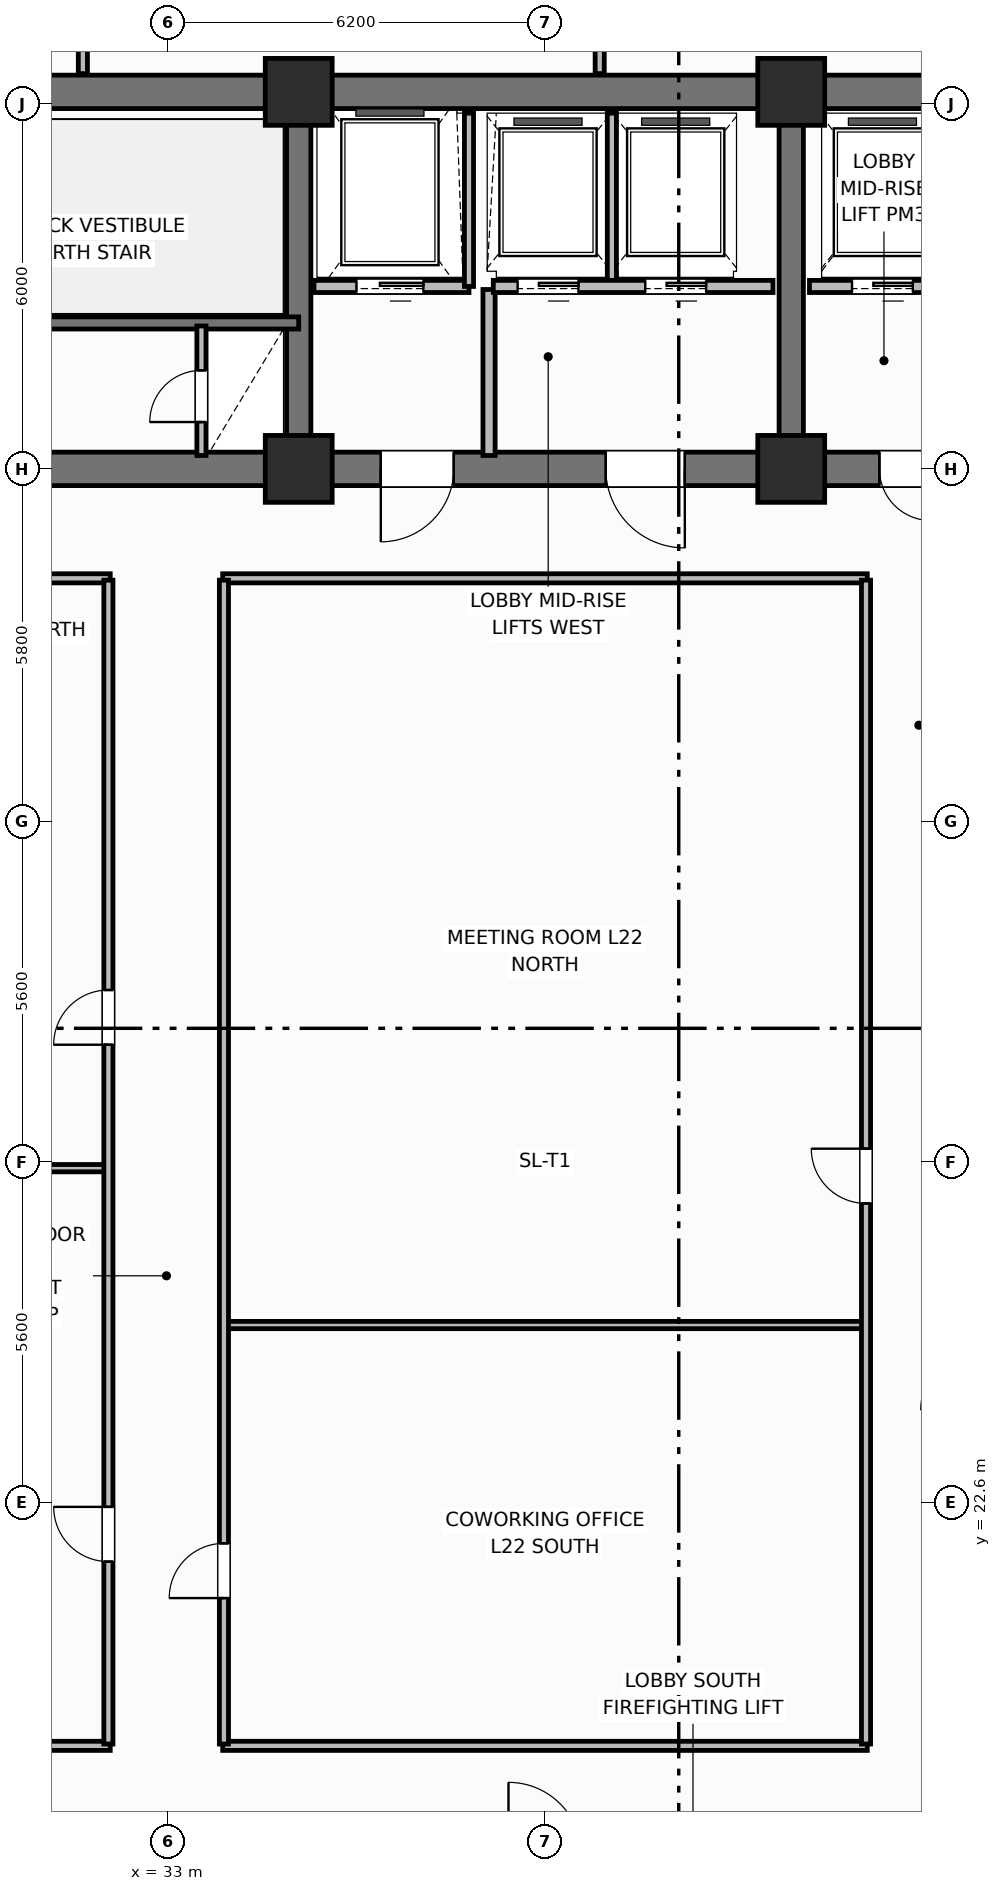
"""IFC4 building model, lengths in metres.
Left out: names, types, materials, properties, quantities, classifications, styles, units other than length and angle.
Written with IfcOpenShell. Run it as: python <this file> out.ifc"""

import sys

from ifc_helpers import new_model, si_unit, direction, frame, frame_2d, origin, origin_2d, place, context, subcontext, project, spatial, rectangle, extrude, element, fill, save


model = new_model("IFC4")
c1 = context("Model", 3, precision=1e-05, world=origin(), true_north=direction((0.0, 1.0)))
c2 = subcontext(c1, "Body", "Model", "MODEL_VIEW")
j1 = project(units=[si_unit("LENGTHUNIT", "METRE"), si_unit("PLANEANGLEUNIT", "RADIAN")], contexts=[c1])
p1 = place(None, origin())
s1 = spatial("IfcSite", under=j1, at=p1, CompositionType="ELEMENT")
p2 = place(p1, origin())
s2 = spatial("IfcBuilding", under=s1, at=p2, CompositionType="ELEMENT")
p3 = place(p2, frame((0.0, 0.0, 92.0)))
s3 = spatial("IfcBuildingStorey", under=s2, at=p3, CompositionType="ELEMENT", Elevation=92.0)
p4 = place(p3, frame((25.6, 45.8, 0.0), z_axis=(0.0, 0.0, 1.0), x_axis=(1.0, 0.0, 0.0)))
e1 = element("IfcWall", 1, at=p4, inside=s3, PredefinedType="SHEAR", context=c2, shape_type="SweptSolid", body=[
    extrude(rectangle(XDim=27.2, YDim=0.55, at=frame_2d((13.6, 0.0))), origin(), (0.0, 0.0, 1.0), 3.7),
])
p5 = place(p3, frame((52.8, 39.6, 0.0), z_axis=(0.0, 0.0, 1.0), x_axis=(-1.0, 0.0, 0.0)))
e2 = element("IfcWall", 2, at=p5, inside=s3, PredefinedType="SHEAR", context=c2, shape_type="SweptSolid", body=[
    extrude(rectangle(XDim=27.2, YDim=0.55, at=frame_2d((13.6, 0.0))), origin(), (0.0, 0.0, 1.0), 3.7),
])
p6 = place(p5, frame((24.2, 0.0, 0.0)))
e3 = element("IfcOpeningElement", 3, at=p6, cuts=e2, PredefinedType="OPENING", context=c2, shape_type="SweptSolid", body=[
    extrude(rectangle(XDim=1.1, YDim=2.15, at=frame_2d((0.55, 1.075))), frame((0.0, 0.285, 0.0), z_axis=(0.0, -1.0, 0.0), x_axis=(1.0, 0.0, 0.0)), (0.0, 0.0, 1.0), 0.57),
])
p7 = place(p5, frame((15.1, 0.0, 0.0)))
e4 = element("IfcOpeningElement", 4, at=p7, cuts=e2, PredefinedType="OPENING", context=c2, shape_type="SweptSolid", body=[
    extrude(rectangle(XDim=1.2, YDim=2.15, at=frame_2d((0.6, 1.075))), frame((0.0, 0.285, 0.0), z_axis=(0.0, -1.0, 0.0), x_axis=(1.0, 0.0, 0.0)), (0.0, 0.0, 1.0), 0.57),
])
p8 = place(p5, frame((11.3, 0.0, 0.0)))
e5 = element("IfcOpeningElement", 5, at=p8, cuts=e2, PredefinedType="OPENING", context=c2, shape_type="SweptSolid", body=[
    extrude(rectangle(XDim=1.3, YDim=2.2, at=frame_2d((0.65, 1.1))), frame((0.0, 0.285, 0.0), z_axis=(0.0, -1.0, 0.0), x_axis=(1.0, 0.0, 0.0)), (0.0, 0.0, 1.0), 0.57),
])
p9 = place(p5, frame((7.25, 0.0, 0.0)))
e6 = element("IfcOpeningElement", 6, at=p9, cuts=e2, PredefinedType="OPENING", context=c2, shape_type="SweptSolid", body=[
    extrude(rectangle(XDim=0.85, YDim=2.1, at=frame_2d((0.425, 1.05))), frame((0.0, 0.285, 0.0), z_axis=(0.0, -1.0, 0.0), x_axis=(1.0, 0.0, 0.0)), (0.0, 0.0, 1.0), 0.57),
])
p10 = place(p5, frame((3.0, 0.0, 0.0)))
e7 = element("IfcOpeningElement", 7, at=p10, cuts=e2, PredefinedType="OPENING", context=c2, shape_type="SweptSolid", body=[
    extrude(rectangle(XDim=0.9, YDim=2.1, at=frame_2d((0.45, 1.05))), frame((0.0, 0.285, 0.0), z_axis=(0.0, -1.0, 0.0), x_axis=(1.0, 0.0, 0.0)), (0.0, 0.0, 1.0), 0.57),
])
for number, where, z_axis, x_axis in (
    (8, (35.15, 39.875, 0.0), (0.0, 0.0, 1.0), (0.0, 1.0, 0.0)),
    (9, (43.25, 39.875, 0.0), (0.0, 0.0, 1.0), (0.0, 1.0, 0.0)),
):
    element("IfcWall", number, at=place(p3, frame(where, z_axis=z_axis, x_axis=x_axis)), inside=s3, PredefinedType="SHEAR", context=c2, shape_type="SweptSolid", body=[
        extrude(rectangle(XDim=5.65, YDim=0.4, at=frame_2d((2.825, 0.0))), origin(), (0.0, 0.0, 1.0), 3.7),
    ])
for number, where, z_axis, x_axis in (
    (10, (35.15, 39.6, 0.0), (0.0, 0.0, 1.0), (1.0, 0.0, 0.0)),
    (11, (35.15, 45.8, 0.0), (0.0, 0.0, 1.0), (1.0, 0.0, 0.0)),
    (12, (43.25, 39.6, 0.0), (0.0, 0.0, 1.0), (1.0, 0.0, 0.0)),
    (13, (43.25, 45.8, 0.0), (0.0, 0.0, 1.0), (1.0, 0.0, 0.0)),
):
    element("IfcColumn", number, at=place(p3, frame(where, z_axis=z_axis, x_axis=x_axis)), inside=s3, PredefinedType="COLUMN", context=c2, shape_type="SweptSolid", body=[
        extrude(rectangle(XDim=1.1, YDim=1.1, at=origin_2d()), origin(), (0.0, 0.0, 1.0), 3.7),
    ])
p11 = place(p3, frame((35.15, 42.0, 0.0), z_axis=(0.0, 0.0, 1.0), x_axis=(-1.0, 0.0, 0.0)))
e14 = element("IfcWall", 14, at=p11, inside=s3, PredefinedType="SHEAR", context=c2, shape_type="SweptSolid", body=[
    extrude(rectangle(XDim=9.55, YDim=0.2, at=frame_2d((4.775, 0.0))), origin(), (0.0, 0.0, 1.0), 3.7),
])
p12 = place(p11, frame((7.25, 0.0, 0.0)))
e15 = element("IfcOpeningElement", 15, at=p12, cuts=e14, PredefinedType="OPENING", context=c2, shape_type="SweptSolid", body=[
    extrude(rectangle(XDim=1.1, YDim=2.15, at=frame_2d((0.55, 1.075))), frame((0.0, 0.11, 0.0), z_axis=(0.0, -1.0, 0.0), x_axis=(1.0, 0.0, 0.0)), (0.0, 0.0, 1.0), 0.22),
])
p13 = place(p3, frame((33.55, 39.82, 0.0), z_axis=(0.0, 0.0, 1.0), x_axis=(0.0, 1.0, 0.0)))
e16 = element("IfcWall", 16, at=p13, inside=s3, PredefinedType="PARTITIONING", context=c2, shape_type="SweptSolid", body=[
    extrude(rectangle(XDim=2.13, YDim=0.15, at=frame_2d((1.065, 0.0))), origin(), (0.0, 0.0, 1.0), 2.53),
])
p14 = place(p13, frame((0.55, 0.0, 0.0)))
e17 = element("IfcOpeningElement", 17, at=p14, cuts=e16, PredefinedType="OPENING", context=c2, shape_type="SweptSolid", body=[
    extrude(rectangle(XDim=0.85, YDim=2.05, at=frame_2d((0.425, 1.025))), frame((0.0, 0.085, 0.0), z_axis=(0.0, -1.0, 0.0), x_axis=(1.0, 0.0, 0.0)), (0.0, 0.0, 1.0), 0.17),
])
p15 = place(p3, frame((37.95, 42.6, 0.0), z_axis=(0.0, 0.0, 1.0), x_axis=(-1.0, 0.0, 0.0)))
e18 = element("IfcWall", 18, at=p15, inside=s3, PredefinedType="PARTITIONING", context=c2, shape_type="SweptSolid", body=[
    extrude(rectangle(XDim=2.55, YDim=0.2, at=frame_2d((1.275, 0.0))), origin(), (0.0, 0.0, 1.0), 2.3),
])
p16 = place(p15, frame((0.75, 0.0, 0.0)))
e19 = element("IfcOpeningElement", 19, at=p16, cuts=e18, PredefinedType="OPENING", context=c2, shape_type="SweptSolid", body=[
    extrude(rectangle(XDim=1.1, YDim=2.15, at=frame_2d((0.55, 1.075))), frame((0.0, 0.11, 0.0), z_axis=(0.0, -1.0, 0.0), x_axis=(1.0, 0.0, 0.0)), (0.0, 0.0, 1.0), 0.22),
])
p17 = place(p3, frame((37.95, 42.6, 0.0), z_axis=(0.0, 0.0, 1.0), x_axis=(0.0, 1.0, 0.0)))
e20 = element("IfcWall", 20, at=p17, inside=s3, PredefinedType="PARTITIONING", context=c2, shape_type="SweptSolid", body=[
    extrude(rectangle(XDim=2.85, YDim=0.15, at=frame_2d((1.425, 0.0))), origin(), (0.0, 0.0, 1.0), 2.53),
])
p18 = place(p3, frame((38.28, 39.82, 0.0), z_axis=(0.0, 0.0, 1.0), x_axis=(0.0, 1.0, 0.0)))
e21 = element("IfcWall", 21, at=p18, inside=s3, PredefinedType="PARTITIONING", context=c2, shape_type="SweptSolid", body=[
    extrude(rectangle(XDim=2.73, YDim=0.2, at=frame_2d((1.365, 0.0))), origin(), (0.0, 0.0, 1.0), 2.53),
])
p19 = place(p3, frame((40.3, 42.65, 0.0), z_axis=(0.0, 0.0, 1.0), x_axis=(0.0, 1.0, 0.0)))
e22 = element("IfcWall", 22, at=p19, inside=s3, PredefinedType="PARTITIONING", context=c2, shape_type="SweptSolid", body=[
    extrude(rectangle(XDim=2.8, YDim=0.15, at=frame_2d((1.4, 0.0))), origin(), (0.0, 0.0, 1.0), 2.53),
])
p20 = place(p3, frame((42.95, 42.6, 0.0), z_axis=(0.0, 0.0, 1.0), x_axis=(-1.0, 0.0, 0.0)))
e23 = element("IfcWall", 23, at=p20, inside=s3, PredefinedType="PARTITIONING", context=c2, shape_type="SweptSolid", body=[
    extrude(rectangle(XDim=4.6, YDim=0.2, at=frame_2d((2.3, 0.0))), origin(), (0.0, 0.0, 1.0), 2.3),
])
p21 = place(p20, frame((3.2, 0.0, 0.0)))
e24 = element("IfcOpeningElement", 24, at=p21, cuts=e23, PredefinedType="OPENING", context=c2, shape_type="SweptSolid", body=[
    extrude(rectangle(XDim=1.0, YDim=2.15, at=frame_2d((0.5, 1.075))), frame((0.0, 0.11, 0.0), z_axis=(0.0, -1.0, 0.0), x_axis=(1.0, 0.0, 0.0)), (0.0, 0.0, 1.0), 0.22),
])
p22 = place(p20, frame((1.1, 0.0, 0.0)))
e25 = element("IfcOpeningElement", 25, at=p22, cuts=e23, PredefinedType="OPENING", context=c2, shape_type="SweptSolid", body=[
    extrude(rectangle(XDim=1.0, YDim=2.15, at=frame_2d((0.5, 1.075))), frame((0.0, 0.11, 0.0), z_axis=(0.0, -1.0, 0.0), x_axis=(1.0, 0.0, 0.0)), (0.0, 0.0, 1.0), 0.22),
])
p23 = place(p3, frame((52.35, 42.6, 0.0), z_axis=(0.0, 0.0, 1.0), x_axis=(-1.0, 0.0, 0.0)))
e26 = element("IfcWall", 26, at=p23, inside=s3, PredefinedType="PARTITIONING", context=c2, shape_type="SweptSolid", body=[
    extrude(rectangle(XDim=8.8, YDim=0.2, at=frame_2d((4.4, 0.0))), origin(), (0.0, 0.0, 1.0), 2.53),
])
p24 = place(p23, frame((7.1, 0.0, 0.0)))
e27 = element("IfcOpeningElement", 27, at=p24, cuts=e26, PredefinedType="OPENING", context=c2, shape_type="SweptSolid", body=[
    extrude(rectangle(XDim=1.0, YDim=2.15, at=frame_2d((0.5, 1.075))), frame((0.0, 0.11, 0.0), z_axis=(0.0, -1.0, 0.0), x_axis=(1.0, 0.0, 0.0)), (0.0, 0.0, 1.0), 0.22),
])
for number, where, z_axis, x_axis in (
    (28, (25.55, 18.6, 0.0), (0.0, 0.0, 1.0), (1.0, 0.0, 0.0)),
    (29, (25.55, 37.8, 0.0), (0.0, 0.0, 1.0), (1.0, 0.0, 0.0)),
):
    element("IfcWall", number, at=place(p3, frame(where, z_axis=z_axis, x_axis=x_axis)), inside=s3, PredefinedType="PARTITIONING", context=c2, shape_type="SweptSolid", body=[
        extrude(rectangle(XDim=6.5, YDim=0.15, at=frame_2d((3.25, 0.0))), origin(), (0.0, 0.0, 1.0), 2.53),
    ])
for number, where, z_axis, x_axis in (
    (30, (33.9, 18.6, 0.0), (0.0, 0.0, 1.0), (1.0, 0.0, 0.0)),
    (31, (33.9, 37.8, 0.0), (0.0, 0.0, 1.0), (1.0, 0.0, 0.0)),
):
    element("IfcWall", number, at=place(p3, frame(where, z_axis=z_axis, x_axis=x_axis)), inside=s3, PredefinedType="PARTITIONING", context=c2, shape_type="SweptSolid", body=[
        extrude(rectangle(XDim=10.6, YDim=0.15, at=frame_2d((5.3, 0.0))), origin(), (0.0, 0.0, 1.0), 2.53),
    ])
p25 = place(p3, frame((25.6, 28.1, 0.0), z_axis=(0.0, 0.0, 1.0), x_axis=(1.0, 0.0, 0.0)))
e32 = element("IfcWall", 32, at=p25, inside=s3, PredefinedType="PARTITIONING", context=c2, shape_type="SweptSolid", body=[
    extrude(rectangle(XDim=6.42, YDim=0.12, at=frame_2d((3.21, 0.0))), origin(), (0.0, 0.0, 1.0), 2.53),
])
p26 = place(p3, frame((33.92, 25.521, 0.0), z_axis=(0.0, 0.0, 1.0), x_axis=(1.0, 0.0, 0.0)))
e33 = element("IfcWall", 33, at=p26, inside=s3, PredefinedType="PARTITIONING", context=c2, shape_type="SweptSolid", body=[
    extrude(rectangle(XDim=10.56, YDim=0.12, at=frame_2d((5.28, 0.0))), origin(), (0.0, 0.0, 1.0), 2.53),
])
p27 = place(p3, frame((32.02, 18.63, 0.0), z_axis=(0.0, 0.0, 1.0), x_axis=(0.0, 1.0, 0.0)))
e34 = element("IfcWall", 34, at=p27, inside=s3, PredefinedType="PARTITIONING", context=c2, shape_type="SweptSolid", body=[
    extrude(rectangle(XDim=19.14, YDim=0.15, at=frame_2d((9.57, 0.0))), origin(), (0.0, 0.0, 1.0), 2.53),
])
p28 = place(p27, frame((3.0, 0.0, 0.0)))
e35 = element("IfcOpeningElement", 35, at=p28, cuts=e34, PredefinedType="OPENING", context=c2, shape_type="SweptSolid", body=[
    extrude(rectangle(XDim=0.9, YDim=2.1, at=frame_2d((0.45, 1.05))), frame((0.0, 0.085, 0.0), z_axis=(0.0, -1.0, 0.0), x_axis=(1.0, 0.0, 0.0)), (0.0, 0.0, 1.0), 0.17),
])
p29 = place(p27, frame((11.5, 0.0, 0.0)))
e36 = element("IfcOpeningElement", 36, at=p29, cuts=e34, PredefinedType="OPENING", context=c2, shape_type="SweptSolid", body=[
    extrude(rectangle(XDim=0.9, YDim=2.1, at=frame_2d((0.45, 1.05))), frame((0.0, 0.085, 0.0), z_axis=(0.0, -1.0, 0.0), x_axis=(1.0, 0.0, 0.0)), (0.0, 0.0, 1.0), 0.17),
])
p30 = place(p3, frame((33.92, 18.63, 0.0), z_axis=(0.0, 0.0, 1.0), x_axis=(0.0, 1.0, 0.0)))
e37 = element("IfcWall", 37, at=p30, inside=s3, PredefinedType="PARTITIONING", context=c2, shape_type="SweptSolid", body=[
    extrude(rectangle(XDim=19.14, YDim=0.15, at=frame_2d((9.57, 0.0))), origin(), (0.0, 0.0, 1.0), 2.53),
])
p31 = place(p30, frame((2.4, 0.0, 0.0)))
e38 = element("IfcOpeningElement", 38, at=p31, cuts=e37, PredefinedType="OPENING", context=c2, shape_type="SweptSolid", body=[
    extrude(rectangle(XDim=0.9, YDim=2.1, at=frame_2d((0.45, 1.05))), frame((0.0, 0.085, 0.0), z_axis=(0.0, -1.0, 0.0), x_axis=(1.0, 0.0, 0.0)), (0.0, 0.0, 1.0), 0.17),
])
p32 = place(p3, frame((44.48, 18.63, 0.0), z_axis=(0.0, 0.0, 1.0), x_axis=(0.0, 1.0, 0.0)))
e39 = element("IfcWall", 39, at=p32, inside=s3, PredefinedType="PARTITIONING", context=c2, shape_type="SweptSolid", body=[
    extrude(rectangle(XDim=19.14, YDim=0.15, at=frame_2d((9.57, 0.0))), origin(), (0.0, 0.0, 1.0), 2.53),
])
p33 = place(p32, frame((8.89, 0.0, 0.0)))
e40 = element("IfcOpeningElement", 40, at=p33, cuts=e39, PredefinedType="OPENING", context=c2, shape_type="SweptSolid", body=[
    extrude(rectangle(XDim=0.9, YDim=2.1, at=frame_2d((0.45, 1.05))), frame((0.0, 0.085, 0.0), z_axis=(0.0, -1.0, 0.0), x_axis=(1.0, 0.0, 0.0)), (0.0, 0.0, 1.0), 0.17),
])
p34 = place(p3, frame((31.6, 46.1, 0.0), z_axis=(0.0, 0.0, 1.0), x_axis=(0.0, 1.0, 0.0)))
e41 = element("IfcWall", 41, at=p34, inside=s3, PredefinedType="PARTITIONING", context=c2, shape_type="SweptSolid", body=[
    extrude(rectangle(XDim=5.33, YDim=0.15, at=frame_2d((2.665, 0.0))), origin(), (0.0, 0.0, 1.0), 2.53),
])
p35 = place(p34, frame((0.85, 0.0, 0.0)))
e42 = element("IfcOpeningElement", 42, at=p35, cuts=e41, PredefinedType="OPENING", context=c2, shape_type="SweptSolid", body=[
    extrude(rectangle(XDim=0.9, YDim=2.1, at=frame_2d((0.45, 1.05))), frame((0.0, 0.085, 0.0), z_axis=(0.0, -1.0, 0.0), x_axis=(1.0, 0.0, 0.0)), (0.0, 0.0, 1.0), 0.17),
])
p36 = place(p3, frame((40.1, 46.1, 0.0), z_axis=(0.0, 0.0, 1.0), x_axis=(0.0, 1.0, 0.0)))
e43 = element("IfcWall", 43, at=p36, inside=s3, PredefinedType="PARTITIONING", context=c2, shape_type="SweptSolid", body=[
    extrude(rectangle(XDim=5.33, YDim=0.15, at=frame_2d((2.665, 0.0))), origin(), (0.0, 0.0, 1.0), 2.53),
])
p37 = place(p14, origin())
e44 = element("IfcDoor", 44, at=p37, inside=s3, OperationType="SINGLE_SWING_LEFT", PredefinedType="TRAPDOOR", context=c2, shape_type="SweptSolid", body=[
    extrude(rectangle(XDim=0.85, YDim=2.05, at=frame_2d((0.425, 1.025))), frame((0.0, 0.025, 0.0), z_axis=(0.0, -1.0, 0.0), x_axis=(1.0, 0.0, 0.0)), (0.0, 0.0, 1.0), 0.05),
])
fill(e17, e44)
p38 = place(p16, origin())
e45 = element("IfcDoor", 45, at=p38, inside=s3, OperationType="SLIDING_TO_LEFT", PredefinedType="DOOR", context=c2, shape_type="SweptSolid", body=[
    extrude(rectangle(XDim=1.1, YDim=2.15, at=frame_2d((0.55, 1.075))), frame((0.0, 0.025, 0.0), z_axis=(0.0, -1.0, 0.0), x_axis=(1.0, 0.0, 0.0)), (0.0, 0.0, 1.0), 0.05),
])
fill(e19, e45)
p39 = place(p21, origin())
e46 = element("IfcDoor", 46, at=p39, inside=s3, OperationType="SLIDING_TO_LEFT", PredefinedType="DOOR", context=c2, shape_type="SweptSolid", body=[
    extrude(rectangle(XDim=1.0, YDim=2.15, at=frame_2d((0.5, 1.075))), frame((0.0, 0.025, 0.0), z_axis=(0.0, -1.0, 0.0), x_axis=(1.0, 0.0, 0.0)), (0.0, 0.0, 1.0), 0.05),
])
fill(e24, e46)
p40 = place(p22, origin())
e47 = element("IfcDoor", 47, at=p40, inside=s3, OperationType="SLIDING_TO_LEFT", PredefinedType="DOOR", context=c2, shape_type="SweptSolid", body=[
    extrude(rectangle(XDim=1.0, YDim=2.15, at=frame_2d((0.5, 1.075))), frame((0.0, 0.025, 0.0), z_axis=(0.0, -1.0, 0.0), x_axis=(1.0, 0.0, 0.0)), (0.0, 0.0, 1.0), 0.05),
])
fill(e25, e47)
p41 = place(p24, origin())
e48 = element("IfcDoor", 48, at=p41, inside=s3, OperationType="SLIDING_TO_LEFT", PredefinedType="DOOR", context=c2, shape_type="SweptSolid", body=[
    extrude(rectangle(XDim=1.0, YDim=2.15, at=frame_2d((0.5, 1.075))), frame((0.0, 0.025, 0.0), z_axis=(0.0, -1.0, 0.0), x_axis=(1.0, 0.0, 0.0)), (0.0, 0.0, 1.0), 0.05),
])
fill(e27, e48)
p42 = place(p28, origin())
e49 = element("IfcDoor", 49, at=p42, inside=s3, OperationType="SINGLE_SWING_RIGHT", PredefinedType="DOOR", context=c2, shape_type="SweptSolid", body=[
    extrude(rectangle(XDim=0.9, YDim=2.1, at=frame_2d((0.45, 1.05))), frame((0.0, 0.025, 0.0), z_axis=(0.0, -1.0, 0.0), x_axis=(1.0, 0.0, 0.0)), (0.0, 0.0, 1.0), 0.05),
])
fill(e35, e49)
p43 = place(p29, origin())
e50 = element("IfcDoor", 50, at=p43, inside=s3, OperationType="SINGLE_SWING_LEFT", PredefinedType="DOOR", context=c2, shape_type="SweptSolid", body=[
    extrude(rectangle(XDim=0.9, YDim=2.1, at=frame_2d((0.45, 1.05))), frame((0.0, 0.025, 0.0), z_axis=(0.0, -1.0, 0.0), x_axis=(1.0, 0.0, 0.0)), (0.0, 0.0, 1.0), 0.05),
])
fill(e36, e50)
p44 = place(p31, origin())
e51 = element("IfcDoor", 51, at=p44, inside=s3, OperationType="SINGLE_SWING_LEFT", PredefinedType="DOOR", context=c2, shape_type="SweptSolid", body=[
    extrude(rectangle(XDim=0.9, YDim=2.1, at=frame_2d((0.45, 1.05))), frame((0.0, 0.025, 0.0), z_axis=(0.0, -1.0, 0.0), x_axis=(1.0, 0.0, 0.0)), (0.0, 0.0, 1.0), 0.05),
])
fill(e38, e51)
p45 = place(p33, origin())
e52 = element("IfcDoor", 52, at=p45, inside=s3, OperationType="SINGLE_SWING_RIGHT", PredefinedType="DOOR", context=c2, shape_type="SweptSolid", body=[
    extrude(rectangle(XDim=0.9, YDim=2.1, at=frame_2d((0.45, 1.05))), frame((0.0, 0.025, 0.0), z_axis=(0.0, -1.0, 0.0), x_axis=(1.0, 0.0, 0.0)), (0.0, 0.0, 1.0), 0.05),
])
fill(e40, e52)
p46 = place(p7, origin())
e53 = element("IfcDoor", 53, at=p46, inside=s3, OperationType="SINGLE_SWING_RIGHT", PredefinedType="DOOR", context=c2, shape_type="SweptSolid", body=[
    extrude(rectangle(XDim=1.2, YDim=2.15, at=frame_2d((0.6, 1.075))), frame((0.0, 0.025, 0.0), z_axis=(0.0, -1.0, 0.0), x_axis=(1.0, 0.0, 0.0)), (0.0, 0.0, 1.0), 0.05),
])
fill(e4, e53)
p47 = place(p8, origin())
e54 = element("IfcDoor", 54, at=p47, inside=s3, OperationType="SINGLE_SWING_LEFT", PredefinedType="DOOR", context=c2, shape_type="SweptSolid", body=[
    extrude(rectangle(XDim=1.3, YDim=2.2, at=frame_2d((0.65, 1.1))), frame((0.0, 0.025, 0.0), z_axis=(0.0, -1.0, 0.0), x_axis=(1.0, 0.0, 0.0)), (0.0, 0.0, 1.0), 0.05),
])
fill(e5, e54)
p48 = place(p9, origin())
e55 = element("IfcDoor", 55, at=p48, inside=s3, OperationType="SINGLE_SWING_LEFT", PredefinedType="DOOR", context=c2, shape_type="SweptSolid", body=[
    extrude(rectangle(XDim=0.85, YDim=2.1, at=frame_2d((0.425, 1.05))), frame((0.0, 0.025, 0.0), z_axis=(0.0, -1.0, 0.0), x_axis=(1.0, 0.0, 0.0)), (0.0, 0.0, 1.0), 0.05),
])
fill(e6, e55)
save(model, sys.argv[1])
